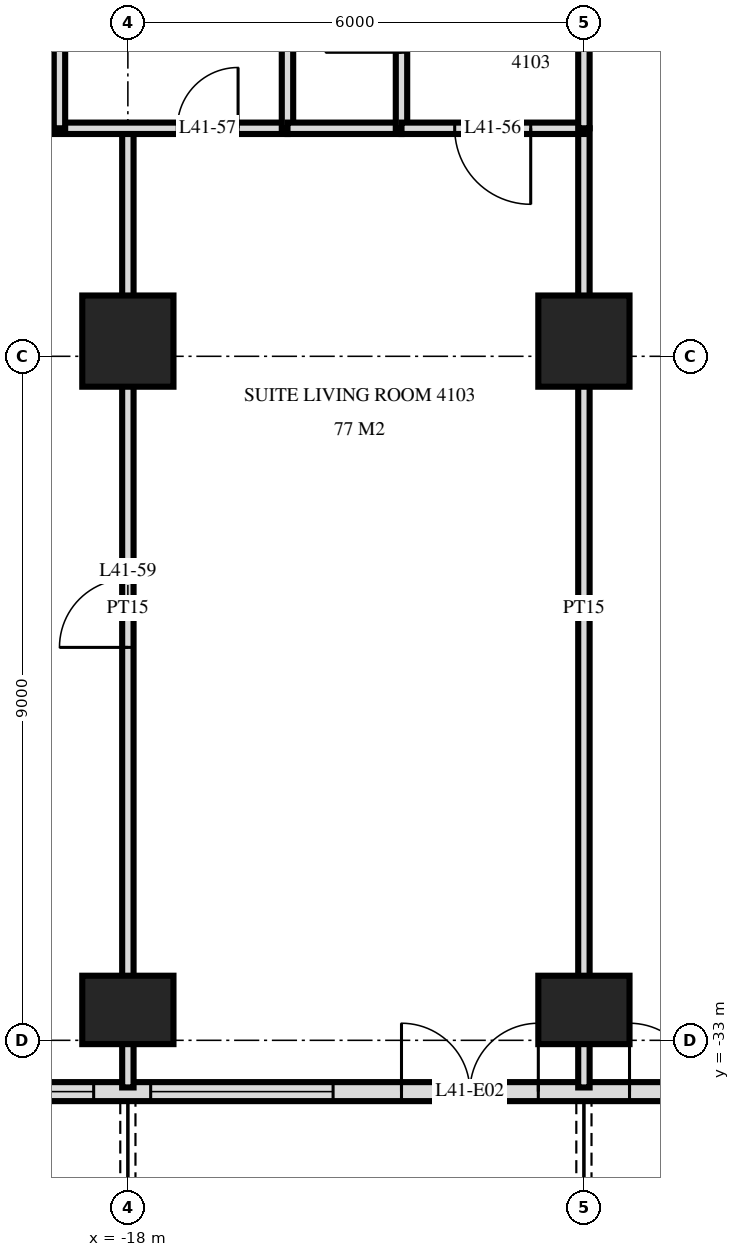
"""IFC4 building model, lengths in metres.
Left out: names, types, materials, properties, quantities, classifications, styles, units other than length and angle.
Written with IfcOpenShell. Run it as: python <this file> out.ifc"""

import sys

from ifc_helpers import new_model, si_unit, direction, frame, frame_2d, origin, origin_2d, place, context, subcontext, project, spatial, rectangle, extrude, element, fill, save


model = new_model("IFC4")
c1 = context("Model", 3, precision=1e-05, world=origin(), true_north=direction((0.0, 1.0)))
c2 = subcontext(c1, "Body", "Model", "MODEL_VIEW")
j1 = project(units=[si_unit("LENGTHUNIT", "METRE"), si_unit("PLANEANGLEUNIT", "RADIAN")], contexts=[c1])
p1 = place(None, origin())
s1 = spatial("IfcSite", under=j1, at=p1, CompositionType="ELEMENT")
p2 = place(p1, origin())
s2 = spatial("IfcBuilding", under=s1, at=p2, CompositionType="ELEMENT")
p3 = place(p2, frame((0.0, 0.0, 159.6)))
s3 = spatial("IfcBuildingStorey", under=s2, at=p3, CompositionType="ELEMENT", Elevation=159.6)
p4 = place(p3, frame((-18.0, -32.6, 0.0), z_axis=(0.0, 0.0, 1.0), x_axis=(1.0, 0.0, 0.0)))
e1 = element("IfcColumn", 1, at=p4, inside=s3, PredefinedType="COLUMN", context=c2, shape_type="SweptSolid", body=[
    extrude(rectangle(XDim=1.2, YDim=0.9, at=origin_2d()), origin(), (0.0, 0.0, 1.0), 3.6),
])
p5 = place(p3, frame((-18.0, -23.8, 0.0), z_axis=(0.0, 0.0, 1.0), x_axis=(1.0, 0.0, 0.0)))
e2 = element("IfcColumn", 2, at=p5, inside=s3, PredefinedType="COLUMN", context=c2, shape_type="SweptSolid", body=[
    extrude(rectangle(XDim=1.2, YDim=1.2, at=origin_2d()), origin(), (0.0, 0.0, 1.0), 3.6),
])
p6 = place(p3, frame((-12.0, -32.6, 0.0), z_axis=(0.0, 0.0, 1.0), x_axis=(1.0, 0.0, 0.0)))
e3 = element("IfcColumn", 3, at=p6, inside=s3, PredefinedType="COLUMN", context=c2, shape_type="SweptSolid", body=[
    extrude(rectangle(XDim=1.2, YDim=0.9, at=origin_2d()), origin(), (0.0, 0.0, 1.0), 3.6),
])
p7 = place(p3, frame((-12.0, -23.8, 0.0), z_axis=(0.0, 0.0, 1.0), x_axis=(1.0, 0.0, 0.0)))
e4 = element("IfcColumn", 4, at=p7, inside=s3, PredefinedType="COLUMN", context=c2, shape_type="SweptSolid", body=[
    extrude(rectangle(XDim=1.2, YDim=1.2, at=origin_2d()), origin(), (0.0, 0.0, 1.0), 3.6),
])
p8 = place(p3, frame((-23.675, -33.675, 0.0), z_axis=(0.0, 0.0, 1.0), x_axis=(1.0, 0.0, 0.0)))
e5 = element("IfcWall", 5, at=p8, inside=s3, PredefinedType="SOLIDWALL", context=c2, shape_type="SweptSolid", body=[
    extrude(rectangle(XDim=47.351, YDim=0.25, at=frame_2d((23.675, 0.0))), origin(), (0.0, 0.0, 1.0), 3.32),
])
p9 = place(p8, frame((0.575, 0.0, 0.0)))
e6 = element("IfcOpeningElement", 6, at=p9, cuts=e5, PredefinedType="OPENING", context=c2, shape_type="SweptSolid", body=[
    extrude(rectangle(XDim=1.8, YDim=2.4, at=frame_2d((0.9, 1.2))), frame((0.0, 0.135, 0.0), z_axis=(0.0, -1.0, 0.0), x_axis=(1.0, 0.0, 0.0)), (0.0, 0.0, 1.0), 0.27),
])
p10 = place(p8, frame((3.425, 0.0, 0.3)))
e7 = element("IfcOpeningElement", 7, at=p10, cuts=e5, PredefinedType="OPENING", context=c2, shape_type="SweptSolid", body=[
    extrude(rectangle(XDim=1.8, YDim=2.1, at=frame_2d((0.9, 1.05))), frame((0.0, 0.135, 0.0), z_axis=(0.0, -1.0, 0.0), x_axis=(1.0, 0.0, 0.0)), (0.0, 0.0, 1.0), 0.27),
])
p11 = place(p8, frame((5.975, 0.0, 0.3)))
e8 = element("IfcOpeningElement", 8, at=p11, cuts=e5, PredefinedType="OPENING", context=c2, shape_type="SweptSolid", body=[
    extrude(rectangle(XDim=2.4, YDim=2.1, at=frame_2d((1.2, 1.05))), frame((0.0, 0.135, 0.0), z_axis=(0.0, -1.0, 0.0), x_axis=(1.0, 0.0, 0.0)), (0.0, 0.0, 1.0), 0.27),
])
p12 = place(p8, frame((9.275, 0.0, 0.0)))
e9 = element("IfcOpeningElement", 9, at=p12, cuts=e5, PredefinedType="OPENING", context=c2, shape_type="SweptSolid", body=[
    extrude(rectangle(XDim=1.8, YDim=2.4, at=frame_2d((0.9, 1.2))), frame((0.0, 0.135, 0.0), z_axis=(0.0, -1.0, 0.0), x_axis=(1.0, 0.0, 0.0)), (0.0, 0.0, 1.0), 0.27),
])
p13 = place(p8, frame((12.275, 0.0, 0.0)))
e10 = element("IfcOpeningElement", 10, at=p13, cuts=e5, PredefinedType="OPENING", context=c2, shape_type="SweptSolid", body=[
    extrude(rectangle(XDim=1.8, YDim=2.4, at=frame_2d((0.9, 1.2))), frame((0.0, 0.135, 0.0), z_axis=(0.0, -1.0, 0.0), x_axis=(1.0, 0.0, 0.0)), (0.0, 0.0, 1.0), 0.27),
])
p14 = place(p8, frame((14.975, 0.0, 0.3)))
e11 = element("IfcOpeningElement", 11, at=p14, cuts=e5, PredefinedType="OPENING", context=c2, shape_type="SweptSolid", body=[
    extrude(rectangle(XDim=2.4, YDim=2.1, at=frame_2d((1.2, 1.05))), frame((0.0, 0.135, 0.0), z_axis=(0.0, -1.0, 0.0), x_axis=(1.0, 0.0, 0.0)), (0.0, 0.0, 1.0), 0.27),
])
p15 = place(p8, frame((17.975, 0.0, 0.3)))
e12 = element("IfcOpeningElement", 12, at=p15, cuts=e5, PredefinedType="OPENING", context=c2, shape_type="SweptSolid", body=[
    extrude(rectangle(XDim=2.4, YDim=2.1, at=frame_2d((1.2, 1.05))), frame((0.0, 0.135, 0.0), z_axis=(0.0, -1.0, 0.0), x_axis=(1.0, 0.0, 0.0)), (0.0, 0.0, 1.0), 0.27),
])
p16 = place(p8, frame((21.275, 0.0, 0.0)))
e13 = element("IfcOpeningElement", 13, at=p16, cuts=e5, PredefinedType="OPENING", context=c2, shape_type="SweptSolid", body=[
    extrude(rectangle(XDim=1.8, YDim=2.4, at=frame_2d((0.9, 1.2))), frame((0.0, 0.135, 0.0), z_axis=(0.0, -1.0, 0.0), x_axis=(1.0, 0.0, 0.0)), (0.0, 0.0, 1.0), 0.27),
])
p17 = place(p8, frame((24.275, 0.0, 0.0)))
e14 = element("IfcOpeningElement", 14, at=p17, cuts=e5, PredefinedType="OPENING", context=c2, shape_type="SweptSolid", body=[
    extrude(rectangle(XDim=1.8, YDim=2.4, at=frame_2d((0.9, 1.2))), frame((0.0, 0.135, 0.0), z_axis=(0.0, -1.0, 0.0), x_axis=(1.0, 0.0, 0.0)), (0.0, 0.0, 1.0), 0.27),
])
p18 = place(p8, frame((26.975, 0.0, 0.3)))
e15 = element("IfcOpeningElement", 15, at=p18, cuts=e5, PredefinedType="OPENING", context=c2, shape_type="SweptSolid", body=[
    extrude(rectangle(XDim=2.4, YDim=2.1, at=frame_2d((1.2, 1.05))), frame((0.0, 0.135, 0.0), z_axis=(0.0, -1.0, 0.0), x_axis=(1.0, 0.0, 0.0)), (0.0, 0.0, 1.0), 0.27),
])
p19 = place(p8, frame((30.275, 0.0, 0.0)))
e16 = element("IfcOpeningElement", 16, at=p19, cuts=e5, PredefinedType="OPENING", context=c2, shape_type="SweptSolid", body=[
    extrude(rectangle(XDim=1.8, YDim=2.4, at=frame_2d((0.9, 1.2))), frame((0.0, 0.135, 0.0), z_axis=(0.0, -1.0, 0.0), x_axis=(1.0, 0.0, 0.0)), (0.0, 0.0, 1.0), 0.27),
])
p20 = place(p8, frame((32.975, 0.0, 0.3)))
e17 = element("IfcOpeningElement", 17, at=p20, cuts=e5, PredefinedType="OPENING", context=c2, shape_type="SweptSolid", body=[
    extrude(rectangle(XDim=2.4, YDim=2.1, at=frame_2d((1.2, 1.05))), frame((0.0, 0.135, 0.0), z_axis=(0.0, -1.0, 0.0), x_axis=(1.0, 0.0, 0.0)), (0.0, 0.0, 1.0), 0.27),
])
p21 = place(p8, frame((36.275, 0.0, 0.0)))
e18 = element("IfcOpeningElement", 18, at=p21, cuts=e5, PredefinedType="OPENING", context=c2, shape_type="SweptSolid", body=[
    extrude(rectangle(XDim=1.8, YDim=2.4, at=frame_2d((0.9, 1.2))), frame((0.0, 0.135, 0.0), z_axis=(0.0, -1.0, 0.0), x_axis=(1.0, 0.0, 0.0)), (0.0, 0.0, 1.0), 0.27),
])
p22 = place(p8, frame((38.975, 0.0, 0.3)))
e19 = element("IfcOpeningElement", 19, at=p22, cuts=e5, PredefinedType="OPENING", context=c2, shape_type="SweptSolid", body=[
    extrude(rectangle(XDim=2.4, YDim=2.1, at=frame_2d((1.2, 1.05))), frame((0.0, 0.135, 0.0), z_axis=(0.0, -1.0, 0.0), x_axis=(1.0, 0.0, 0.0)), (0.0, 0.0, 1.0), 0.27),
])
p23 = place(p8, frame((41.975, 0.0, 0.3)))
e20 = element("IfcOpeningElement", 20, at=p23, cuts=e5, PredefinedType="OPENING", context=c2, shape_type="SweptSolid", body=[
    extrude(rectangle(XDim=2.4, YDim=2.1, at=frame_2d((1.2, 1.05))), frame((0.0, 0.135, 0.0), z_axis=(0.0, -1.0, 0.0), x_axis=(1.0, 0.0, 0.0)), (0.0, 0.0, 1.0), 0.27),
])
p24 = place(p8, frame((45.125, 0.0, 0.0)))
e21 = element("IfcOpeningElement", 21, at=p24, cuts=e5, PredefinedType="OPENING", context=c2, shape_type="SweptSolid", body=[
    extrude(rectangle(XDim=1.8, YDim=2.4, at=frame_2d((0.9, 1.2))), frame((0.0, 0.135, 0.0), z_axis=(0.0, -1.0, 0.0), x_axis=(1.0, 0.0, 0.0)), (0.0, 0.0, 1.0), 0.27),
])
p25 = place(p3, frame((-12.0, -21.0, 0.0), z_axis=(0.0, 0.0, 1.0), x_axis=(0.0, 1.0, 0.0)))
e22 = element("IfcWall", 22, at=p25, inside=s3, PredefinedType="PARTITIONING", context=c2, shape_type="SweptSolid", body=[
    extrude(rectangle(XDim=5.95, YDim=0.15, at=frame_2d((2.975, 0.0))), origin(), (0.0, 0.0, 1.0), 3.32),
])
p26 = place(p25, frame((4.0, 0.0, 0.0)))
e23 = element("IfcOpeningElement", 23, at=p26, cuts=e22, PredefinedType="OPENING", context=c2, shape_type="SweptSolid", body=[
    extrude(rectangle(XDim=1.0, YDim=2.1, at=frame_2d((0.5, 1.05))), frame((0.0, 0.085, 0.0), z_axis=(0.0, -1.0, 0.0), x_axis=(1.0, 0.0, 0.0)), (0.0, 0.0, 1.0), 0.17),
])
p27 = place(p3, frame((-12.0, -33.62, 0.0), z_axis=(0.0, 0.0, 1.0), x_axis=(0.0, 1.0, 0.0)))
e24 = element("IfcWall", 24, at=p27, inside=s3, PredefinedType="PARTITIONING", context=c2, shape_type="SweptSolid", body=[
    extrude(rectangle(XDim=12.62, YDim=0.15, at=frame_2d((6.31, 0.0))), origin(), (0.0, 0.0, 1.0), 3.32),
])
p28 = place(p3, frame((-14.4, -21.0, 0.0), z_axis=(0.0, 0.0, 1.0), x_axis=(0.0, 1.0, 0.0)))
e25 = element("IfcWall", 25, at=p28, inside=s3, PredefinedType="PARTITIONING", context=c2, shape_type="SweptSolid", body=[
    extrude(rectangle(XDim=3.0, YDim=0.15, at=frame_2d((1.5, 0.0))), origin(), (0.0, 0.0, 1.0), 3.32),
])
p29 = place(p28, frame((1.0, 0.0, 0.0)))
e26 = element("IfcOpeningElement", 26, at=p29, cuts=e25, PredefinedType="OPENING", context=c2, shape_type="SweptSolid", body=[
    extrude(rectangle(XDim=1.0, YDim=2.1, at=frame_2d((0.5, 1.05))), frame((0.0, 0.085, 0.0), z_axis=(0.0, -1.0, 0.0), x_axis=(1.0, 0.0, 0.0)), (0.0, 0.0, 1.0), 0.17),
])
p30 = place(p3, frame((-15.9, -21.0, 0.0), z_axis=(0.0, 0.0, 1.0), x_axis=(0.0, 1.0, 0.0)))
e27 = element("IfcWall", 27, at=p30, inside=s3, PredefinedType="PLUMBINGWALL", context=c2, shape_type="SweptSolid", body=[
    extrude(rectangle(XDim=3.0, YDim=0.15, at=frame_2d((1.5, 0.0))), origin(), (0.0, 0.0, 1.0), 3.32),
])
p31 = place(p3, frame((-18.0, -33.62, 0.0), z_axis=(0.0, 0.0, 1.0), x_axis=(0.0, 1.0, 0.0)))
e28 = element("IfcWall", 28, at=p31, inside=s3, PredefinedType="PARTITIONING", context=c2, shape_type="SweptSolid", body=[
    extrude(rectangle(XDim=12.62, YDim=0.15, at=frame_2d((6.31, 0.0))), origin(), (0.0, 0.0, 1.0), 3.32),
])
p32 = place(p31, frame((5.79, 0.0, 0.0)))
e29 = element("IfcOpeningElement", 29, at=p32, cuts=e28, PredefinedType="OPENING", context=c2, shape_type="SweptSolid", body=[
    extrude(rectangle(XDim=0.9, YDim=2.1, at=frame_2d((0.45, 1.05))), frame((0.0, 0.085, 0.0), z_axis=(0.0, -1.0, 0.0), x_axis=(1.0, 0.0, 0.0)), (0.0, 0.0, 1.0), 0.17),
])
p33 = place(p3, frame((-18.9, -21.0, 0.0), z_axis=(0.0, 0.0, 1.0), x_axis=(0.0, 1.0, 0.0)))
e30 = element("IfcWall", 30, at=p33, inside=s3, PredefinedType="PARTITIONING", context=c2, shape_type="SweptSolid", body=[
    extrude(rectangle(XDim=3.0, YDim=0.15, at=frame_2d((1.5, 0.0))), origin(), (0.0, 0.0, 1.0), 3.32),
])
p34 = place(p3, frame((-14.4, -21.0, 0.0), z_axis=(0.0, 0.0, 1.0), x_axis=(1.0, 0.0, 0.0)))
e31 = element("IfcWall", 31, at=p34, inside=s3, PredefinedType="PARTITIONING", context=c2, shape_type="SweptSolid", body=[
    extrude(rectangle(XDim=2.4, YDim=0.15, at=frame_2d((1.2, 0.0))), origin(), (0.0, 0.0, 1.0), 3.32),
])
p35 = place(p34, frame((0.7, 0.0, 0.0)))
e32 = element("IfcOpeningElement", 32, at=p35, cuts=e31, PredefinedType="OPENING", context=c2, shape_type="SweptSolid", body=[
    extrude(rectangle(XDim=1.0, YDim=2.1, at=frame_2d((0.5, 1.05))), frame((0.0, 0.085, 0.0), z_axis=(0.0, -1.0, 0.0), x_axis=(1.0, 0.0, 0.0)), (0.0, 0.0, 1.0), 0.17),
])
p36 = place(p3, frame((-28.02, -21.0, 0.0), z_axis=(0.0, 0.0, 1.0), x_axis=(1.0, 0.0, 0.0)))
e33 = element("IfcWall", 33, at=p36, inside=s3, PredefinedType="PARTITIONING", context=c2, shape_type="SweptSolid", body=[
    extrude(rectangle(XDim=12.12, YDim=0.15, at=frame_2d((6.06, 0.0))), origin(), (0.0, 0.0, 1.0), 3.32),
])
p37 = place(p36, frame((10.67, 0.0, 0.0)))
e34 = element("IfcOpeningElement", 34, at=p37, cuts=e33, PredefinedType="OPENING", context=c2, shape_type="SweptSolid", body=[
    extrude(rectangle(XDim=0.8, YDim=2.1, at=frame_2d((0.4, 1.05))), frame((0.0, 0.085, 0.0), z_axis=(0.0, -1.0, 0.0), x_axis=(1.0, 0.0, 0.0)), (0.0, 0.0, 1.0), 0.17),
])
p38 = place(p36, frame((4.02, 0.0, 0.0)))
e35 = element("IfcOpeningElement", 35, at=p38, cuts=e33, PredefinedType="OPENING", context=c2, shape_type="SweptSolid", body=[
    extrude(rectangle(XDim=0.9, YDim=2.1, at=frame_2d((0.45, 1.05))), frame((0.0, 0.085, 0.0), z_axis=(0.0, -1.0, 0.0), x_axis=(1.0, 0.0, 0.0)), (0.0, 0.0, 1.0), 0.17),
])
p39 = place(p3, frame((-15.9, -21.0, 0.0), z_axis=(0.0, 0.0, 1.0), x_axis=(1.0, 0.0, 0.0)))
e36 = element("IfcWall", 36, at=p39, inside=s3, PredefinedType="PLUMBINGWALL", context=c2, shape_type="SweptSolid", body=[
    extrude(rectangle(XDim=1.5, YDim=0.15, at=frame_2d((0.75, 0.0))), origin(), (0.0, 0.0, 1.0), 3.32),
])
p40 = place(p10, origin())
e37 = element("IfcWindow", 37, at=p40, inside=s3, PartitioningType="SINGLE_PANEL", PredefinedType="WINDOW", context=c2, shape_type="SweptSolid", body=[
    extrude(rectangle(XDim=1.8, YDim=2.1, at=frame_2d((0.9, 1.05))), frame((0.0, 0.03, 0.0), z_axis=(0.0, -1.0, 0.0), x_axis=(1.0, 0.0, 0.0)), (0.0, 0.0, 1.0), 0.06),
])
fill(e7, e37)
p41 = place(p11, origin())
e38 = element("IfcWindow", 38, at=p41, inside=s3, PartitioningType="SINGLE_PANEL", PredefinedType="WINDOW", context=c2, shape_type="SweptSolid", body=[
    extrude(rectangle(XDim=2.4, YDim=2.1, at=frame_2d((1.2, 1.05))), frame((0.0, 0.03, 0.0), z_axis=(0.0, -1.0, 0.0), x_axis=(1.0, 0.0, 0.0)), (0.0, 0.0, 1.0), 0.06),
])
fill(e8, e38)
p42 = place(p12, origin())
e39 = element("IfcDoor", 39, at=p42, inside=s3, OperationType="DOUBLE_DOOR_SINGLE_SWING", PredefinedType="DOOR", context=c2, shape_type="SweptSolid", body=[
    extrude(rectangle(XDim=1.8, YDim=2.4, at=frame_2d((0.9, 1.2))), frame((0.0, 0.025, 0.0), z_axis=(0.0, -1.0, 0.0), x_axis=(1.0, 0.0, 0.0)), (0.0, 0.0, 1.0), 0.05),
])
fill(e9, e39)
p43 = place(p13, origin())
e40 = element("IfcDoor", 40, at=p43, inside=s3, OperationType="DOUBLE_DOOR_SINGLE_SWING", PredefinedType="DOOR", context=c2, shape_type="SweptSolid", body=[
    extrude(rectangle(XDim=1.8, YDim=2.4, at=frame_2d((0.9, 1.2))), frame((0.0, 0.025, 0.0), z_axis=(0.0, -1.0, 0.0), x_axis=(1.0, 0.0, 0.0)), (0.0, 0.0, 1.0), 0.05),
])
fill(e10, e40)
p44 = place(p35, frame((0.5, 0.0, 0.0), z_axis=(0.0, 0.0, 1.0), x_axis=(-1.0, 0.0, 0.0)))
e41 = element("IfcDoor", 41, at=p44, inside=s3, OperationType="SINGLE_SWING_RIGHT", PredefinedType="DOOR", context=c2, shape_type="SweptSolid", body=[
    extrude(rectangle(XDim=1.0, YDim=2.1, at=frame_2d((0.0, 1.05))), frame((0.0, -0.025, 0.0), z_axis=(0.0, 1.0, 0.0), x_axis=(-1.0, 0.0, 0.0)), (0.0, 0.0, 1.0), 0.05),
])
fill(e32, e41)
p45 = place(p37, origin())
e42 = element("IfcDoor", 42, at=p45, inside=s3, OperationType="SINGLE_SWING_LEFT", PredefinedType="DOOR", context=c2, shape_type="SweptSolid", body=[
    extrude(rectangle(XDim=0.8, YDim=2.1, at=frame_2d((0.4, 1.05))), frame((0.0, 0.025, 0.0), z_axis=(0.0, -1.0, 0.0), x_axis=(1.0, 0.0, 0.0)), (0.0, 0.0, 1.0), 0.05),
])
fill(e34, e42)
p46 = place(p32, origin())
e43 = element("IfcDoor", 43, at=p46, inside=s3, OperationType="SINGLE_SWING_RIGHT", PredefinedType="DOOR", context=c2, shape_type="SweptSolid", body=[
    extrude(rectangle(XDim=0.9, YDim=2.1, at=frame_2d((0.45, 1.05))), frame((0.0, 0.025, 0.0), z_axis=(0.0, -1.0, 0.0), x_axis=(1.0, 0.0, 0.0)), (0.0, 0.0, 1.0), 0.05),
])
fill(e29, e43)
save(model, sys.argv[1])
